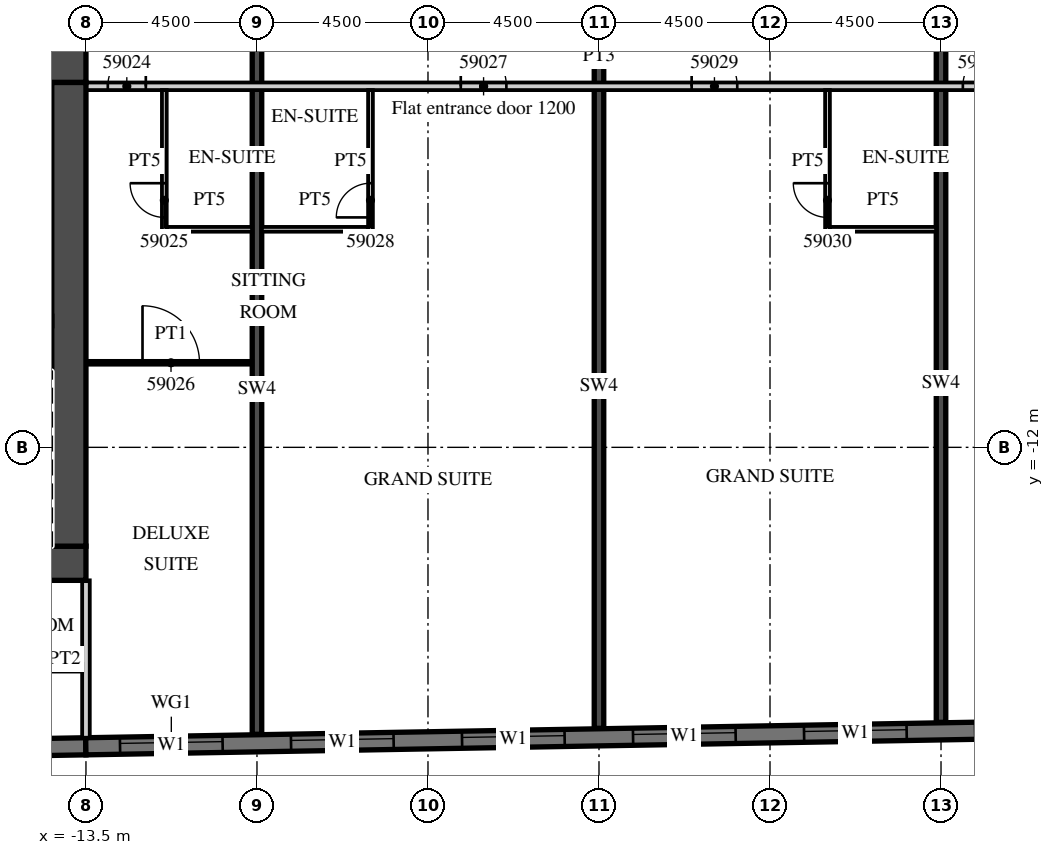
"""IFC4 building model, lengths in metres.
Left out: names, types, materials, properties, quantities, classifications, styles, units other than length and angle.
Written with IfcOpenShell. Run it as: python <this file> out.ifc"""

import sys

from ifc_helpers import new_model, si_unit, direction, frame, frame_2d, origin, place, context, subcontext, project, spatial, rectangle, extrude, element, fill, save


model = new_model("IFC4")
c1 = context("Model", 3, precision=1e-05, world=origin(), true_north=direction((0.0, 1.0)))
c2 = subcontext(c1, "Body", "Model", "MODEL_VIEW")
j1 = project(units=[si_unit("LENGTHUNIT", "METRE"), si_unit("PLANEANGLEUNIT", "RADIAN")], contexts=[c1])
p1 = place(None, origin())
s1 = spatial("IfcSite", under=j1, at=p1, CompositionType="ELEMENT")
p2 = place(p1, origin())
s2 = spatial("IfcBuilding", under=s1, at=p2, CompositionType="ELEMENT")
p3 = place(p2, frame((0.0, 0.0, 240.8)))
s3 = spatial("IfcBuildingStorey", under=s2, at=p3, CompositionType="ELEMENT", Elevation=240.8)
p4 = place(p3, frame((-9.0, -19.55, 0.0), z_axis=(0.0, 0.0, 1.0), x_axis=(0.0, 1.0, 0.0)))
e1 = element("IfcWall", 1, at=p4, inside=s3, PredefinedType="SHEAR", context=c2, shape_type="SweptSolid", body=[
    extrude(rectangle(XDim=18.15, YDim=0.25, at=frame_2d((9.075, 0.0))), origin(), (0.0, 0.0, 1.0), 3.3),
])
p5 = place(p3, frame((0.0, -19.393, 0.0), z_axis=(0.0, 0.0, 1.0), x_axis=(0.0, 1.0, 0.0)))
e2 = element("IfcWall", 2, at=p5, inside=s3, PredefinedType="SHEAR", context=c2, shape_type="SweptSolid", body=[
    extrude(rectangle(XDim=17.993, YDim=0.25, at=frame_2d((8.997, 0.0))), origin(), (0.0, 0.0, 1.0), 3.3),
])
p6 = place(p3, frame((9.0, -19.236, 0.0), z_axis=(0.0, 0.0, 1.0), x_axis=(0.0, 1.0, 0.0)))
e3 = element("IfcWall", 3, at=p6, inside=s3, PredefinedType="SHEAR", context=c2, shape_type="SweptSolid", body=[
    extrude(rectangle(XDim=17.836, YDim=0.25, at=frame_2d((8.918, 0.0))), origin(), (0.0, 0.0, 1.0), 3.3),
])
p7 = place(p3, frame((-31.504, -20.18, 0.0), z_axis=(0.0, 0.0, 1.0), x_axis=(0.999847677887, 0.017453395744, 0.0)))
e4 = element("IfcWall", 4, at=p7, inside=s3, PredefinedType="SOLIDWALL", context=c2, shape_type="SweptSolid", body=[
    extrude(rectangle(XDim=18.003, YDim=0.45, at=frame_2d((9.001, 0.0))), origin(), (0.0, 0.0, 1.0), 3.02),
])
p8 = place(p3, frame((-13.504, -19.866, 0.0), z_axis=(0.0, 0.0, 1.0), x_axis=(0.999847672978, 0.017453676992, 0.0)))
e5 = element("IfcWall", 5, at=p8, inside=s3, PredefinedType="SOLIDWALL", context=c2, shape_type="SweptSolid", body=[
    extrude(rectangle(XDim=52.86, YDim=0.45, at=frame_2d((26.43, 0.0))), origin(), (0.0, 0.0, 1.0), 3.02),
])
p9 = place(p8, frame((0.9, 0.0, 0.45)))
e6 = element("IfcOpeningElement", 6, at=p9, cuts=e5, PredefinedType="OPENING", context=c2, shape_type="SweptSolid", body=[
    extrude(rectangle(XDim=2.7, YDim=2.25, at=frame_2d((1.35, 1.125))), frame((0.0, 0.235, 0.0), z_axis=(0.0, -1.0, 0.0), x_axis=(1.0, 0.0, 0.0)), (0.0, 0.0, 1.0), 0.47),
])
p10 = place(p8, frame((5.401, 0.0, 0.45)))
e7 = element("IfcOpeningElement", 7, at=p10, cuts=e5, PredefinedType="OPENING", context=c2, shape_type="SweptSolid", body=[
    extrude(rectangle(XDim=2.7, YDim=2.25, at=frame_2d((1.35, 1.125))), frame((0.0, 0.235, 0.0), z_axis=(0.0, -1.0, 0.0), x_axis=(1.0, 0.0, 0.0)), (0.0, 0.0, 1.0), 0.47),
])
p11 = place(p8, frame((9.902, 0.0, 0.45)))
e8 = element("IfcOpeningElement", 8, at=p11, cuts=e5, PredefinedType="OPENING", context=c2, shape_type="SweptSolid", body=[
    extrude(rectangle(XDim=2.7, YDim=2.25, at=frame_2d((1.35, 1.125))), frame((0.0, 0.235, 0.0), z_axis=(0.0, -1.0, 0.0), x_axis=(1.0, 0.0, 0.0)), (0.0, 0.0, 1.0), 0.47),
])
p12 = place(p8, frame((14.402, 0.0, 0.45)))
e9 = element("IfcOpeningElement", 9, at=p12, cuts=e5, PredefinedType="OPENING", context=c2, shape_type="SweptSolid", body=[
    extrude(rectangle(XDim=2.7, YDim=2.25, at=frame_2d((1.35, 1.125))), frame((0.0, 0.235, 0.0), z_axis=(0.0, -1.0, 0.0), x_axis=(1.0, 0.0, 0.0)), (0.0, 0.0, 1.0), 0.47),
])
p13 = place(p8, frame((18.903, 0.0, 0.45)))
e10 = element("IfcOpeningElement", 10, at=p13, cuts=e5, PredefinedType="OPENING", context=c2, shape_type="SweptSolid", body=[
    extrude(rectangle(XDim=2.7, YDim=2.25, at=frame_2d((1.35, 1.125))), frame((0.0, 0.235, 0.0), z_axis=(0.0, -1.0, 0.0), x_axis=(1.0, 0.0, 0.0)), (0.0, 0.0, 1.0), 0.47),
])
p14 = place(p8, frame((23.404, 0.0, 0.45)))
e11 = element("IfcOpeningElement", 11, at=p14, cuts=e5, PredefinedType="OPENING", context=c2, shape_type="SweptSolid", body=[
    extrude(rectangle(XDim=2.7, YDim=2.25, at=frame_2d((1.35, 1.125))), frame((0.0, 0.235, 0.0), z_axis=(0.0, -1.0, 0.0), x_axis=(1.0, 0.0, 0.0)), (0.0, 0.0, 1.0), 0.47),
])
p15 = place(p8, frame((27.904, 0.0, 0.45)))
e12 = element("IfcOpeningElement", 12, at=p15, cuts=e5, PredefinedType="OPENING", context=c2, shape_type="SweptSolid", body=[
    extrude(rectangle(XDim=2.7, YDim=2.25, at=frame_2d((1.35, 1.125))), frame((0.0, 0.235, 0.0), z_axis=(0.0, -1.0, 0.0), x_axis=(1.0, 0.0, 0.0)), (0.0, 0.0, 1.0), 0.47),
])
p16 = place(p8, frame((32.405, 0.0, 0.45)))
e13 = element("IfcOpeningElement", 13, at=p16, cuts=e5, PredefinedType="OPENING", context=c2, shape_type="SweptSolid", body=[
    extrude(rectangle(XDim=2.7, YDim=2.25, at=frame_2d((1.35, 1.125))), frame((0.0, 0.235, 0.0), z_axis=(0.0, -1.0, 0.0), x_axis=(1.0, 0.0, 0.0)), (0.0, 0.0, 1.0), 0.47),
])
p17 = place(p8, frame((36.906, 0.0, 0.45)))
e14 = element("IfcOpeningElement", 14, at=p17, cuts=e5, PredefinedType="OPENING", context=c2, shape_type="SweptSolid", body=[
    extrude(rectangle(XDim=2.7, YDim=2.25, at=frame_2d((1.35, 1.125))), frame((0.0, 0.235, 0.0), z_axis=(0.0, -1.0, 0.0), x_axis=(1.0, 0.0, 0.0)), (0.0, 0.0, 1.0), 0.47),
])
p18 = place(p8, frame((41.406, 0.0, 0.45)))
e15 = element("IfcOpeningElement", 15, at=p18, cuts=e5, PredefinedType="OPENING", context=c2, shape_type="SweptSolid", body=[
    extrude(rectangle(XDim=2.7, YDim=2.25, at=frame_2d((1.35, 1.125))), frame((0.0, 0.235, 0.0), z_axis=(0.0, -1.0, 0.0), x_axis=(1.0, 0.0, 0.0)), (0.0, 0.0, 1.0), 0.47),
])
p19 = place(p8, frame((45.907, 0.0, 0.45)))
e16 = element("IfcOpeningElement", 16, at=p19, cuts=e5, PredefinedType="OPENING", context=c2, shape_type="SweptSolid", body=[
    extrude(rectangle(XDim=2.7, YDim=2.25, at=frame_2d((1.35, 1.125))), frame((0.0, 0.235, 0.0), z_axis=(0.0, -1.0, 0.0), x_axis=(1.0, 0.0, 0.0)), (0.0, 0.0, 1.0), 0.47),
])
p20 = place(p3, frame((-13.5, -19.641, 0.0), z_axis=(0.0, 0.0, 1.0), x_axis=(0.0, 1.0, 0.0)))
e17 = element("IfcWall", 17, at=p20, inside=s3, PredefinedType="PARTITIONING", context=c2, shape_type="SweptSolid", body=[
    extrude(rectangle(XDim=4.141, YDim=0.2, at=frame_2d((2.071, 0.0))), origin(), (0.0, 0.0, 1.0), 3.02),
])
p21 = place(p3, frame((-13.5, -2.5, 0.0), z_axis=(0.0, 0.0, 1.0), x_axis=(1.0, 0.0, 0.0)))
e18 = element("IfcWall", 18, at=p21, inside=s3, PredefinedType="PARTITIONING", context=c2, shape_type="SweptSolid", body=[
    extrude(rectangle(XDim=27.0, YDim=0.2, at=frame_2d((13.5, 0.0))), origin(), (0.0, 0.0, 1.0), 3.02),
])
p22 = place(p21, frame((0.575, 0.0, 0.0)))
e19 = element("IfcOpeningElement", 19, at=p22, cuts=e18, PredefinedType="OPENING", context=c2, shape_type="SweptSolid", body=[
    extrude(rectangle(XDim=1.0, YDim=2.1, at=frame_2d((0.5, 1.05))), frame((0.0, 0.11, 0.0), z_axis=(0.0, -1.0, 0.0), x_axis=(1.0, 0.0, 0.0)), (0.0, 0.0, 1.0), 0.22),
])
p23 = place(p21, frame((9.863, 0.0, 0.0)))
e20 = element("IfcOpeningElement", 20, at=p23, cuts=e18, PredefinedType="OPENING", context=c2, shape_type="SweptSolid", body=[
    extrude(rectangle(XDim=1.2, YDim=2.1, at=frame_2d((0.6, 1.05))), frame((0.0, 0.11, 0.0), z_axis=(0.0, -1.0, 0.0), x_axis=(1.0, 0.0, 0.0)), (0.0, 0.0, 1.0), 0.22),
])
p24 = place(p21, frame((15.938, 0.0, 0.0)))
e21 = element("IfcOpeningElement", 21, at=p24, cuts=e18, PredefinedType="OPENING", context=c2, shape_type="SweptSolid", body=[
    extrude(rectangle(XDim=1.2, YDim=2.1, at=frame_2d((0.6, 1.05))), frame((0.0, 0.11, 0.0), z_axis=(0.0, -1.0, 0.0), x_axis=(1.0, 0.0, 0.0)), (0.0, 0.0, 1.0), 0.22),
])
p25 = place(p21, frame((23.075, 0.0, 0.0)))
e22 = element("IfcOpeningElement", 22, at=p25, cuts=e18, PredefinedType="OPENING", context=c2, shape_type="SweptSolid", body=[
    extrude(rectangle(XDim=1.0, YDim=2.1, at=frame_2d((0.5, 1.05))), frame((0.0, 0.11, 0.0), z_axis=(0.0, -1.0, 0.0), x_axis=(1.0, 0.0, 0.0)), (0.0, 0.0, 1.0), 0.22),
])
p26 = place(p3, frame((-11.438, -6.325, 0.0), z_axis=(0.0, 0.0, 1.0), x_axis=(0.0, 1.0, 0.0)))
e23 = element("IfcWall", 23, at=p26, inside=s3, PredefinedType="PARTITIONING", context=c2, shape_type="SweptSolid", body=[
    extrude(rectangle(XDim=3.725, YDim=0.125, at=frame_2d((1.862, 0.0))), origin(), (0.0, 0.0, 1.0), 3.02),
])
p27 = place(p26, frame((0.375, 0.0, 0.0)))
e24 = element("IfcOpeningElement", 24, at=p27, cuts=e23, PredefinedType="OPENING", context=c2, shape_type="SweptSolid", body=[
    extrude(rectangle(XDim=0.9, YDim=2.1, at=frame_2d((0.45, 1.05))), frame((0.0, 0.073, 0.0), z_axis=(0.0, -1.0, 0.0), x_axis=(1.0, 0.0, 0.0)), (0.0, 0.0, 1.0), 0.145),
])
p28 = place(p3, frame((-11.375, -6.263, 0.0), z_axis=(0.0, 0.0, 1.0), x_axis=(1.0, 0.0, 0.0)))
e25 = element("IfcWall", 25, at=p28, inside=s3, PredefinedType="PARTITIONING", context=c2, shape_type="SweptSolid", body=[
    extrude(rectangle(XDim=2.25, YDim=0.125, at=frame_2d((1.125, 0.0))), origin(), (0.0, 0.0, 1.0), 3.02),
])
p29 = place(p3, frame((-13.4, -9.775, 0.0), z_axis=(0.0, 0.0, 1.0), x_axis=(1.0, 0.0, 0.0)))
e26 = element("IfcWall", 26, at=p29, inside=s3, PredefinedType="PARTITIONING", context=c2, shape_type="SweptSolid", body=[
    extrude(rectangle(XDim=4.275, YDim=0.1, at=frame_2d((2.137, 0.0))), origin(), (0.0, 0.0, 1.0), 3.02),
])
p30 = place(p29, frame((1.388, 0.0, 0.0)))
e27 = element("IfcOpeningElement", 27, at=p30, cuts=e26, PredefinedType="OPENING", context=c2, shape_type="SweptSolid", body=[
    extrude(rectangle(XDim=1.5, YDim=2.1, at=frame_2d((0.75, 1.05))), frame((0.0, 0.06, 0.0), z_axis=(0.0, -1.0, 0.0), x_axis=(1.0, 0.0, 0.0)), (0.0, 0.0, 1.0), 0.12),
])
p31 = place(p3, frame((-6.013, -6.325, 0.0), z_axis=(0.0, 0.0, 1.0), x_axis=(0.0, 1.0, 0.0)))
e28 = element("IfcWall", 28, at=p31, inside=s3, PredefinedType="PARTITIONING", context=c2, shape_type="SweptSolid", body=[
    extrude(rectangle(XDim=3.725, YDim=0.125, at=frame_2d((1.862, 0.0))), origin(), (0.0, 0.0, 1.0), 3.02),
])
p32 = place(p31, frame((0.375, 0.0, 0.0)))
e29 = element("IfcOpeningElement", 29, at=p32, cuts=e28, PredefinedType="OPENING", context=c2, shape_type="SweptSolid", body=[
    extrude(rectangle(XDim=0.9, YDim=2.1, at=frame_2d((0.45, 1.05))), frame((0.0, 0.073, 0.0), z_axis=(0.0, -1.0, 0.0), x_axis=(1.0, 0.0, 0.0)), (0.0, 0.0, 1.0), 0.145),
])
p33 = place(p3, frame((-8.875, -6.263, 0.0), z_axis=(0.0, 0.0, 1.0), x_axis=(1.0, 0.0, 0.0)))
e30 = element("IfcWall", 30, at=p33, inside=s3, PredefinedType="PARTITIONING", context=c2, shape_type="SweptSolid", body=[
    extrude(rectangle(XDim=2.8, YDim=0.125, at=frame_2d((1.4, 0.0))), origin(), (0.0, 0.0, 1.0), 3.02),
])
p34 = place(p3, frame((6.013, -6.325, 0.0), z_axis=(0.0, 0.0, 1.0), x_axis=(0.0, 1.0, 0.0)))
e31 = element("IfcWall", 31, at=p34, inside=s3, PredefinedType="PARTITIONING", context=c2, shape_type="SweptSolid", body=[
    extrude(rectangle(XDim=3.725, YDim=0.125, at=frame_2d((1.862, 0.0))), origin(), (0.0, 0.0, 1.0), 3.02),
])
p35 = place(p34, frame((0.375, 0.0, 0.0)))
e32 = element("IfcOpeningElement", 32, at=p35, cuts=e31, PredefinedType="OPENING", context=c2, shape_type="SweptSolid", body=[
    extrude(rectangle(XDim=0.9, YDim=2.1, at=frame_2d((0.45, 1.05))), frame((0.0, 0.073, 0.0), z_axis=(0.0, -1.0, 0.0), x_axis=(1.0, 0.0, 0.0)), (0.0, 0.0, 1.0), 0.145),
])
p36 = place(p3, frame((6.075, -6.263, 0.0), z_axis=(0.0, 0.0, 1.0), x_axis=(1.0, 0.0, 0.0)))
e33 = element("IfcWall", 33, at=p36, inside=s3, PredefinedType="PARTITIONING", context=c2, shape_type="SweptSolid", body=[
    extrude(rectangle(XDim=2.8, YDim=0.125, at=frame_2d((1.4, 0.0))), origin(), (0.0, 0.0, 1.0), 3.02),
])
p37 = place(p3, frame((-31.5, -1.95, 0.0), z_axis=(0.0, 0.0, 1.0), x_axis=(1.0, 0.0, 0.0)))
e34 = element("IfcWall", 34, at=p37, inside=s3, PredefinedType="SHEAR", context=c2, shape_type="SweptSolid", body=[
    extrude(rectangle(XDim=18.0, YDim=0.9, at=frame_2d((9.0, 0.0))), origin(), (0.0, 0.0, 1.0), 3.02),
])
p38 = place(p37, frame((14.725, 0.0, 0.0)))
e35 = element("IfcOpeningElement", 35, at=p38, cuts=e34, PredefinedType="OPENING", context=c2, shape_type="SweptSolid", body=[
    extrude(rectangle(XDim=1.8, YDim=2.1, at=frame_2d((0.9, 1.05))), frame((0.0, 0.46, 0.0), z_axis=(0.0, -1.0, 0.0), x_axis=(1.0, 0.0, 0.0)), (0.0, 0.0, 1.0), 0.92),
])
p39 = place(p3, frame((-20.3, -15.05, 0.0), z_axis=(0.0, 0.0, 1.0), x_axis=(1.0, 0.0, 0.0)))
e36 = element("IfcWall", 36, at=p39, inside=s3, PredefinedType="SHEAR", context=c2, shape_type="SweptSolid", body=[
    extrude(rectangle(XDim=6.8, YDim=0.9, at=frame_2d((3.4, 0.0))), origin(), (0.0, 0.0, 1.0), 3.02),
])
p40 = place(p39, frame((0.875, 0.0, 0.0)))
e37 = element("IfcOpeningElement", 37, at=p40, cuts=e36, PredefinedType="OPENING", context=c2, shape_type="SweptSolid", body=[
    extrude(rectangle(XDim=1.2, YDim=2.1, at=frame_2d((0.6, 1.05))), frame((0.0, 0.46, 0.0), z_axis=(0.0, -1.0, 0.0), x_axis=(1.0, 0.0, 0.0)), (0.0, 0.0, 1.0), 0.92),
])
p41 = place(p3, frame((-13.95, -14.6, 0.0), z_axis=(0.0, 0.0, 1.0), x_axis=(0.0, 1.0, 0.0)))
e38 = element("IfcWall", 38, at=p41, inside=s3, PredefinedType="SHEAR", context=c2, shape_type="SweptSolid", body=[
    extrude(rectangle(XDim=12.2, YDim=0.9, at=frame_2d((6.1, 0.0))), origin(), (0.0, 0.0, 1.0), 3.02),
])
p42 = place(p3, frame((-35.864, -17.8, 0.0), z_axis=(0.0, 0.0, 1.0), x_axis=(1.0, 0.0, 0.0)))
e39 = element("IfcWall", 39, at=p42, inside=s3, PredefinedType="PARTITIONING", context=c2, shape_type="SweptSolid", body=[
    extrude(rectangle(XDim=22.264, YDim=0.2, at=frame_2d((11.132, 0.0))), origin(), (0.0, 0.0, 1.0), 3.02),
])
p43 = place(p42, frame((4.751, 0.0, 0.0)))
e40 = element("IfcOpeningElement", 40, at=p43, cuts=e39, PredefinedType="OPENING", context=c2, shape_type="SweptSolid", body=[
    extrude(rectangle(XDim=0.9, YDim=2.1, at=frame_2d((0.45, 1.05))), frame((0.0, 0.11, 0.0), z_axis=(0.0, -1.0, 0.0), x_axis=(1.0, 0.0, 0.0)), (0.0, 0.0, 1.0), 0.22),
])
p44 = place(p42, frame((13.051, 0.0, 0.0)))
e41 = element("IfcOpeningElement", 41, at=p44, cuts=e39, PredefinedType="OPENING", context=c2, shape_type="SweptSolid", body=[
    extrude(rectangle(XDim=0.9, YDim=2.1, at=frame_2d((0.45, 1.05))), frame((0.0, 0.11, 0.0), z_axis=(0.0, -1.0, 0.0), x_axis=(1.0, 0.0, 0.0)), (0.0, 0.0, 1.0), 0.22),
])
p45 = place(p9, origin())
e42 = element("IfcWindow", 42, at=p45, inside=s3, PartitioningType="SINGLE_PANEL", PredefinedType="WINDOW", context=c2, shape_type="SweptSolid", body=[
    extrude(rectangle(XDim=2.7, YDim=2.25, at=frame_2d((1.35, 1.125))), frame((0.0, 0.09, 0.0), z_axis=(0.0, -1.0, 0.0), x_axis=(1.0, 0.0, 0.0)), (0.0, 0.0, 1.0), 0.06),
])
fill(e6, e42)
p46 = place(p10, origin())
e43 = element("IfcWindow", 43, at=p46, inside=s3, PartitioningType="SINGLE_PANEL", PredefinedType="WINDOW", context=c2, shape_type="SweptSolid", body=[
    extrude(rectangle(XDim=2.7, YDim=2.25, at=frame_2d((1.35, 1.125))), frame((0.0, 0.09, 0.0), z_axis=(0.0, -1.0, 0.0), x_axis=(1.0, 0.0, 0.0)), (0.0, 0.0, 1.0), 0.06),
])
fill(e7, e43)
p47 = place(p11, origin())
e44 = element("IfcWindow", 44, at=p47, inside=s3, PartitioningType="SINGLE_PANEL", PredefinedType="WINDOW", context=c2, shape_type="SweptSolid", body=[
    extrude(rectangle(XDim=2.7, YDim=2.25, at=frame_2d((1.35, 1.125))), frame((0.0, 0.09, 0.0), z_axis=(0.0, -1.0, 0.0), x_axis=(1.0, 0.0, 0.0)), (0.0, 0.0, 1.0), 0.06),
])
fill(e8, e44)
p48 = place(p12, origin())
e45 = element("IfcWindow", 45, at=p48, inside=s3, PartitioningType="SINGLE_PANEL", PredefinedType="WINDOW", context=c2, shape_type="SweptSolid", body=[
    extrude(rectangle(XDim=2.7, YDim=2.25, at=frame_2d((1.35, 1.125))), frame((0.0, 0.09, 0.0), z_axis=(0.0, -1.0, 0.0), x_axis=(1.0, 0.0, 0.0)), (0.0, 0.0, 1.0), 0.06),
])
fill(e9, e45)
p49 = place(p13, origin())
e46 = element("IfcWindow", 46, at=p49, inside=s3, PartitioningType="SINGLE_PANEL", PredefinedType="WINDOW", context=c2, shape_type="SweptSolid", body=[
    extrude(rectangle(XDim=2.7, YDim=2.25, at=frame_2d((1.35, 1.125))), frame((0.0, 0.09, 0.0), z_axis=(0.0, -1.0, 0.0), x_axis=(1.0, 0.0, 0.0)), (0.0, 0.0, 1.0), 0.06),
])
fill(e10, e46)
p50 = place(p22, origin())
e47 = element("IfcDoor", 47, at=p50, inside=s3, OperationType="SINGLE_SWING_RIGHT", PredefinedType="DOOR", context=c2, shape_type="SweptSolid", body=[
    extrude(rectangle(XDim=1.0, YDim=2.1, at=frame_2d((0.5, 1.05))), frame((0.0, 0.025, 0.0), z_axis=(0.0, -1.0, 0.0), x_axis=(1.0, 0.0, 0.0)), (0.0, 0.0, 1.0), 0.05),
])
fill(e19, e47)
p51 = place(p27, origin())
e48 = element("IfcDoor", 48, at=p51, inside=s3, OperationType="SINGLE_SWING_RIGHT", PredefinedType="DOOR", context=c2, shape_type="SweptSolid", body=[
    extrude(rectangle(XDim=0.9, YDim=2.1, at=frame_2d((0.45, 1.05))), frame((0.0, 0.025, 0.0), z_axis=(0.0, -1.0, 0.0), x_axis=(1.0, 0.0, 0.0)), (0.0, 0.0, 1.0), 0.05),
])
fill(e24, e48)
p52 = place(p30, origin())
e49 = element("IfcDoor", 49, at=p52, inside=s3, OperationType="SINGLE_SWING_LEFT", PredefinedType="DOOR", context=c2, shape_type="SweptSolid", body=[
    extrude(rectangle(XDim=1.5, YDim=2.1, at=frame_2d((0.75, 1.05))), frame((0.0, 0.025, 0.0), z_axis=(0.0, -1.0, 0.0), x_axis=(1.0, 0.0, 0.0)), (0.0, 0.0, 1.0), 0.05),
])
fill(e27, e49)
p53 = place(p23, origin())
e50 = element("IfcDoor", 50, at=p53, inside=s3, OperationType="SINGLE_SWING_LEFT", PredefinedType="DOOR", context=c2, shape_type="SweptSolid", body=[
    extrude(rectangle(XDim=1.2, YDim=2.1, at=frame_2d((0.6, 1.05))), frame((0.0, 0.025, 0.0), z_axis=(0.0, -1.0, 0.0), x_axis=(1.0, 0.0, 0.0)), (0.0, 0.0, 1.0), 0.05),
])
fill(e20, e50)
p54 = place(p32, origin())
e51 = element("IfcDoor", 51, at=p54, inside=s3, OperationType="SINGLE_SWING_LEFT", PredefinedType="DOOR", context=c2, shape_type="SweptSolid", body=[
    extrude(rectangle(XDim=0.9, YDim=2.1, at=frame_2d((0.45, 1.05))), frame((0.0, 0.025, 0.0), z_axis=(0.0, -1.0, 0.0), x_axis=(1.0, 0.0, 0.0)), (0.0, 0.0, 1.0), 0.05),
])
fill(e29, e51)
p55 = place(p24, origin())
e52 = element("IfcDoor", 52, at=p55, inside=s3, OperationType="SINGLE_SWING_LEFT", PredefinedType="DOOR", context=c2, shape_type="SweptSolid", body=[
    extrude(rectangle(XDim=1.2, YDim=2.1, at=frame_2d((0.6, 1.05))), frame((0.0, 0.025, 0.0), z_axis=(0.0, -1.0, 0.0), x_axis=(1.0, 0.0, 0.0)), (0.0, 0.0, 1.0), 0.05),
])
fill(e21, e52)
p56 = place(p35, origin())
e53 = element("IfcDoor", 53, at=p56, inside=s3, OperationType="SINGLE_SWING_RIGHT", PredefinedType="DOOR", context=c2, shape_type="SweptSolid", body=[
    extrude(rectangle(XDim=0.9, YDim=2.1, at=frame_2d((0.45, 1.05))), frame((0.0, 0.025, 0.0), z_axis=(0.0, -1.0, 0.0), x_axis=(1.0, 0.0, 0.0)), (0.0, 0.0, 1.0), 0.05),
])
fill(e32, e53)
p57 = place(p25, origin())
e54 = element("IfcDoor", 54, at=p57, inside=s3, OperationType="SINGLE_SWING_RIGHT", PredefinedType="DOOR", context=c2, shape_type="SweptSolid", body=[
    extrude(rectangle(XDim=1.0, YDim=2.1, at=frame_2d((0.5, 1.05))), frame((0.0, 0.025, 0.0), z_axis=(0.0, -1.0, 0.0), x_axis=(1.0, 0.0, 0.0)), (0.0, 0.0, 1.0), 0.05),
])
fill(e22, e54)
save(model, sys.argv[1])
